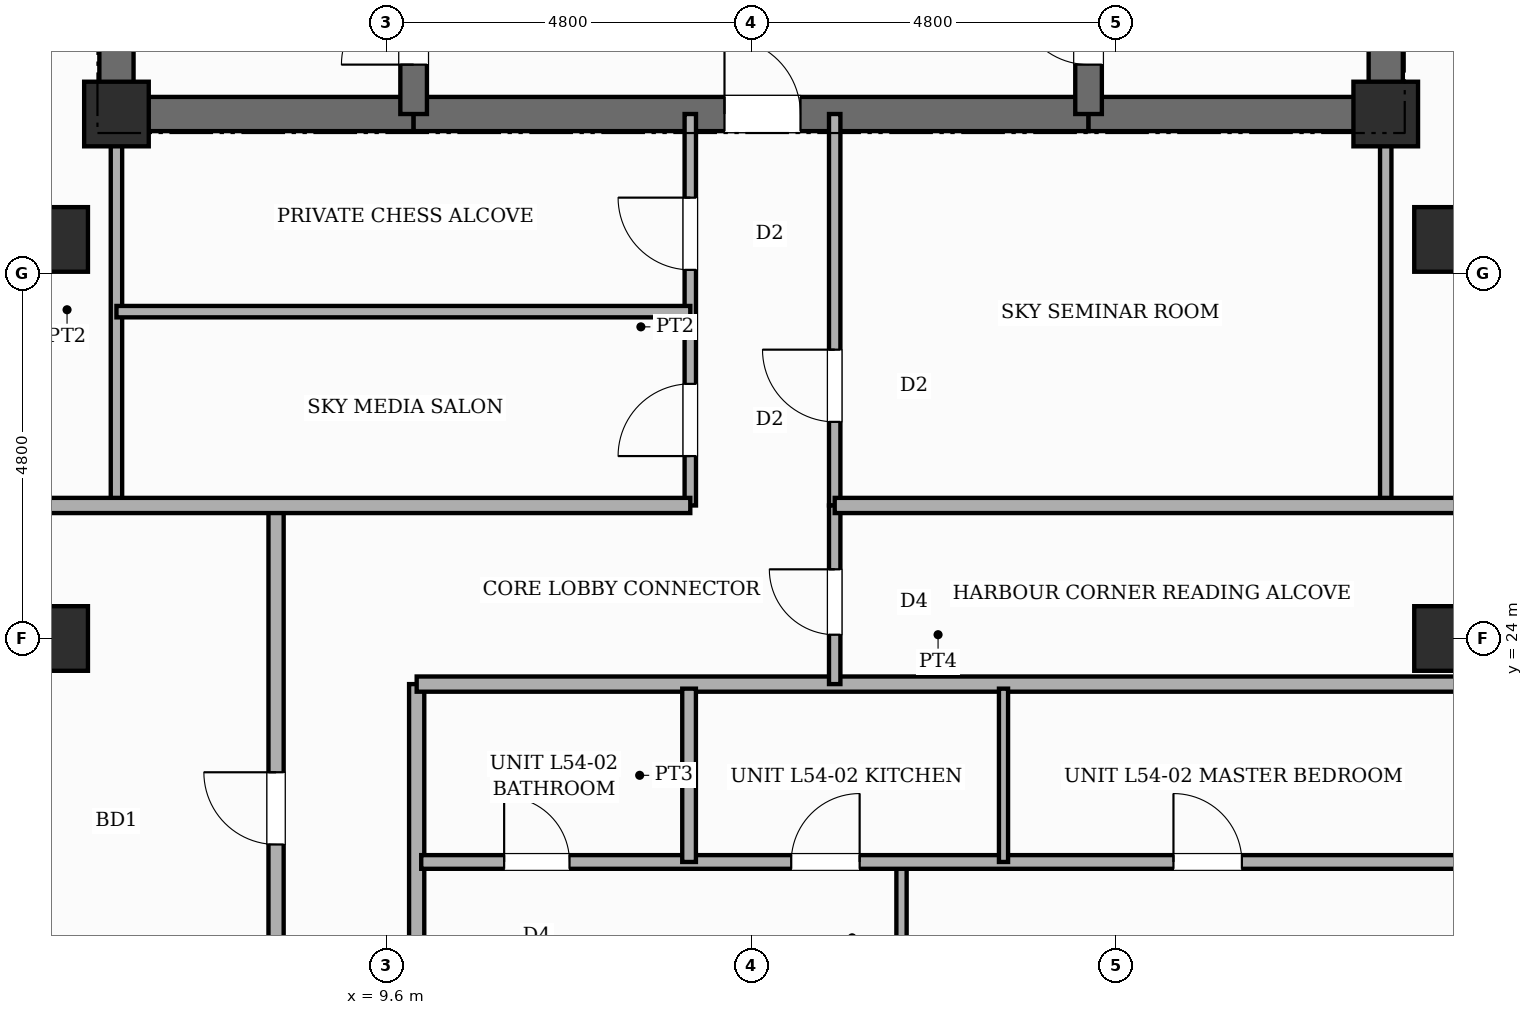
"""IFC4 building model, lengths in metres.
Left out: names, types, materials, properties, quantities, classifications, styles, units other than length and angle.
Written with IfcOpenShell. Run it as: python <this file> out.ifc"""

import sys

from ifc_helpers import new_model, si_unit, direction, frame, frame_2d, origin, origin_2d, place, context, subcontext, project, spatial, rectangle, extrude, element, fill, save


model = new_model("IFC4")
c1 = context("Model", 3, precision=1e-05, world=origin(), true_north=direction((0.0, 1.0)))
c2 = subcontext(c1, "Body", "Model", "MODEL_VIEW")
j1 = project(units=[si_unit("LENGTHUNIT", "METRE"), si_unit("PLANEANGLEUNIT", "RADIAN")], contexts=[c1])
p1 = place(None, origin())
s1 = spatial("IfcSite", under=j1, at=p1, CompositionType="ELEMENT")
p2 = place(p1, origin())
s2 = spatial("IfcBuilding", under=s1, at=p2, CompositionType="ELEMENT")
p3 = place(p2, frame((0.0, 0.0, 207.4)))
s3 = spatial("IfcBuildingStorey", under=s2, at=p3, CompositionType="ELEMENT", Elevation=207.4)
p4 = place(p3, frame((6.05, 30.675, 0.0), z_axis=(0.0, 0.0, 1.0), x_axis=(0.0, 1.0, 0.0)))
e1 = element("IfcWall", 1, at=p4, inside=s3, PredefinedType="SHEAR", context=c2, shape_type="SweptSolid", body=[
    extrude(rectangle(XDim=15.35, YDim=0.45, at=frame_2d((7.675, 0.0))), origin(), (0.0, 0.0, 1.0), 3.6),
])
p5 = place(p4, frame((10.675, 0.0, 0.0)))
e2 = element("IfcOpeningElement", 2, at=p5, cuts=e1, PredefinedType="OPENING", context=c2, shape_type="SweptSolid", body=[
    extrude(rectangle(XDim=0.95, YDim=2.15, at=frame_2d((0.475, 1.075))), frame((0.0, 0.235, 0.0), z_axis=(0.0, -1.0, 0.0), x_axis=(1.0, 0.0, 0.0)), (0.0, 0.0, 1.0), 0.47),
])
p6 = place(p3, frame((22.75, 30.675, 0.0), z_axis=(0.0, 0.0, 1.0), x_axis=(0.0, 1.0, 0.0)))
e3 = element("IfcWall", 3, at=p6, inside=s3, PredefinedType="SHEAR", context=c2, shape_type="SweptSolid", body=[
    extrude(rectangle(XDim=15.35, YDim=0.45, at=frame_2d((7.675, 0.0))), origin(), (0.0, 0.0, 1.0), 3.6),
])
p7 = place(p6, frame((10.675, 0.0, 0.0)))
e4 = element("IfcOpeningElement", 4, at=p7, cuts=e3, PredefinedType="OPENING", context=c2, shape_type="SweptSolid", body=[
    extrude(rectangle(XDim=1.0, YDim=2.15, at=frame_2d((0.5, 1.075))), frame((0.0, 0.235, 0.0), z_axis=(0.0, -1.0, 0.0), x_axis=(1.0, 0.0, 0.0)), (0.0, 0.0, 1.0), 0.47),
])
p8 = place(p3, frame((6.05, 30.9, 0.0), z_axis=(0.0, 0.0, 1.0), x_axis=(1.0, 0.0, 0.0)))
e5 = element("IfcWall", 5, at=p8, inside=s3, PredefinedType="SHEAR", context=c2, shape_type="SweptSolid", body=[
    extrude(rectangle(XDim=3.91, YDim=0.45, at=frame_2d((1.955, 0.0))), origin(), (0.0, 0.0, 1.0), 3.6),
])
p9 = place(p3, frame((9.96, 30.9, 0.0), z_axis=(0.0, 0.0, 1.0), x_axis=(1.0, 0.0, 0.0)))
e6 = element("IfcWall", 6, at=p9, inside=s3, PredefinedType="SHEAR", context=c2, shape_type="SweptSolid", body=[
    extrude(rectangle(XDim=8.88, YDim=0.45, at=frame_2d((4.44, 0.0))), origin(), (0.0, 0.0, 1.0), 3.6),
])
p10 = place(p9, frame((4.09, 0.0, 0.0)))
e7 = element("IfcOpeningElement", 7, at=p10, cuts=e6, PredefinedType="OPENING", context=c2, shape_type="SweptSolid", body=[
    extrude(rectangle(XDim=1.0, YDim=2.15, at=frame_2d((0.5, 1.075))), frame((0.0, 0.235, 0.0), z_axis=(0.0, -1.0, 0.0), x_axis=(1.0, 0.0, 0.0)), (0.0, 0.0, 1.0), 0.47),
])
p11 = place(p3, frame((18.84, 30.9, 0.0), z_axis=(0.0, 0.0, 1.0), x_axis=(1.0, 0.0, 0.0)))
e8 = element("IfcWall", 8, at=p11, inside=s3, PredefinedType="SHEAR", context=c2, shape_type="SweptSolid", body=[
    extrude(rectangle(XDim=3.91, YDim=0.45, at=frame_2d((1.955, 0.0))), origin(), (0.0, 0.0, 1.0), 3.6),
])
p12 = place(p3, frame((9.96, 30.9, 0.0), z_axis=(0.0, 0.0, 1.0), x_axis=(0.0, 1.0, 0.0)))
e9 = element("IfcWall", 9, at=p12, inside=s3, PredefinedType="SHEAR", context=c2, shape_type="SweptSolid", body=[
    extrude(rectangle(XDim=14.9, YDim=0.35, at=frame_2d((7.45, 0.0))), origin(), (0.0, 0.0, 1.0), 3.6),
])
p13 = place(p12, frame((0.65, 0.0, 0.0)))
e10 = element("IfcOpeningElement", 10, at=p13, cuts=e9, PredefinedType="OPENING", context=c2, shape_type="SweptSolid", body=[
    extrude(rectangle(XDim=0.95, YDim=2.1, at=frame_2d((0.475, 1.05))), frame((0.0, 0.185, 0.0), z_axis=(0.0, -1.0, 0.0), x_axis=(1.0, 0.0, 0.0)), (0.0, 0.0, 1.0), 0.37),
])
p14 = place(p12, frame((10.45, 0.0, 0.0)))
e11 = element("IfcOpeningElement", 11, at=p14, cuts=e9, PredefinedType="OPENING", context=c2, shape_type="SweptSolid", body=[
    extrude(rectangle(XDim=1.0, YDim=2.15, at=frame_2d((0.5, 1.075))), frame((0.0, 0.185, 0.0), z_axis=(0.0, -1.0, 0.0), x_axis=(1.0, 0.0, 0.0)), (0.0, 0.0, 1.0), 0.37),
])
p15 = place(p3, frame((18.84, 30.9, 0.0), z_axis=(0.0, 0.0, 1.0), x_axis=(0.0, 1.0, 0.0)))
e12 = element("IfcWall", 12, at=p15, inside=s3, PredefinedType="SHEAR", context=c2, shape_type="SweptSolid", body=[
    extrude(rectangle(XDim=14.9, YDim=0.35, at=frame_2d((7.45, 0.0))), origin(), (0.0, 0.0, 1.0), 3.6),
])
p16 = place(p15, frame((0.65, 0.0, 0.0)))
e13 = element("IfcOpeningElement", 13, at=p16, cuts=e12, PredefinedType="OPENING", context=c2, shape_type="SweptSolid", body=[
    extrude(rectangle(XDim=0.95, YDim=2.1, at=frame_2d((0.475, 1.05))), frame((0.0, 0.185, 0.0), z_axis=(0.0, -1.0, 0.0), x_axis=(1.0, 0.0, 0.0)), (0.0, 0.0, 1.0), 0.37),
])
p17 = place(p15, frame((10.45, 0.0, 0.0)))
e14 = element("IfcOpeningElement", 14, at=p17, cuts=e12, PredefinedType="OPENING", context=c2, shape_type="SweptSolid", body=[
    extrude(rectangle(XDim=1.0, YDim=2.15, at=frame_2d((0.5, 1.075))), frame((0.0, 0.185, 0.0), z_axis=(0.0, -1.0, 0.0), x_axis=(1.0, 0.0, 0.0)), (0.0, 0.0, 1.0), 0.37),
])
for number, where, z_axis, x_axis in (
    (15, (5.25, 24.0, 0.0), (0.0, 0.0, 1.0), (1.0, 0.0, 0.0)),
    (16, (5.25, 29.25, 0.0), (0.0, 0.0, 1.0), (1.0, 0.0, 0.0)),
    (17, (6.05, 30.9, 0.0), (0.0, 0.0, 1.0), (1.0, 0.0, 0.0)),
    (18, (22.75, 30.9, 0.0), (0.0, 0.0, 1.0), (1.0, 0.0, 0.0)),
    (19, (23.55, 24.0, 0.0), (0.0, 0.0, 1.0), (1.0, 0.0, 0.0)),
    (20, (23.55, 29.25, 0.0), (0.0, 0.0, 1.0), (1.0, 0.0, 0.0)),
):
    element("IfcColumn", number, at=place(p3, frame(where, z_axis=z_axis, x_axis=x_axis)), inside=s3, PredefinedType="COLUMN", context=c2, shape_type="SweptSolid", body=[
        extrude(rectangle(XDim=0.85, YDim=0.85, at=origin_2d()), origin(), (0.0, 0.0, 1.0), 3.6),
    ])
p18 = place(p3, frame((13.6, 25.75, 0.0), z_axis=(0.0, 0.0, 1.0), x_axis=(0.0, 1.0, 0.0)))
e21 = element("IfcWall", 21, at=p18, inside=s3, PredefinedType="PARTITIONING", context=c2, shape_type="SweptSolid", body=[
    extrude(rectangle(XDim=5.15, YDim=0.15, at=frame_2d((2.575, 0.0))), origin(), (0.0, 0.0, 1.0), 3.38),
])
p19 = place(p18, frame((0.65, 0.0, 0.0)))
e22 = element("IfcOpeningElement", 22, at=p19, cuts=e21, PredefinedType="OPENING", context=c2, shape_type="SweptSolid", body=[
    extrude(rectangle(XDim=0.95, YDim=2.15, at=frame_2d((0.475, 1.075))), frame((0.0, 0.085, 0.0), z_axis=(0.0, -1.0, 0.0), x_axis=(1.0, 0.0, 0.0)), (0.0, 0.0, 1.0), 0.17),
])
p20 = place(p18, frame((3.1, 0.0, 0.0)))
e23 = element("IfcOpeningElement", 23, at=p20, cuts=e21, PredefinedType="OPENING", context=c2, shape_type="SweptSolid", body=[
    extrude(rectangle(XDim=0.95, YDim=2.15, at=frame_2d((0.475, 1.075))), frame((0.0, 0.085, 0.0), z_axis=(0.0, -1.0, 0.0), x_axis=(1.0, 0.0, 0.0)), (0.0, 0.0, 1.0), 0.17),
])
p21 = place(p3, frame((15.5, 25.75, 0.0), z_axis=(0.0, 0.0, 1.0), x_axis=(0.0, 1.0, 0.0)))
e24 = element("IfcWall", 24, at=p21, inside=s3, PredefinedType="PARTITIONING", context=c2, shape_type="SweptSolid", body=[
    extrude(rectangle(XDim=5.15, YDim=0.15, at=frame_2d((2.575, 0.0))), origin(), (0.0, 0.0, 1.0), 3.38),
])
p22 = place(p21, frame((1.1, 0.0, 0.0)))
e25 = element("IfcOpeningElement", 25, at=p22, cuts=e24, PredefinedType="OPENING", context=c2, shape_type="SweptSolid", body=[
    extrude(rectangle(XDim=0.95, YDim=2.15, at=frame_2d((0.475, 1.075))), frame((0.0, 0.085, 0.0), z_axis=(0.0, -1.0, 0.0), x_axis=(1.0, 0.0, 0.0)), (0.0, 0.0, 1.0), 0.17),
])
for number, where, z_axis, x_axis in (
    (26, (6.05, 25.75, 0.0), (0.0, 0.0, 1.0), (0.0, 1.0, 0.0)),
    (27, (22.75, 25.75, 0.0), (0.0, 0.0, 1.0), (0.0, 1.0, 0.0)),
):
    element("IfcWall", number, at=place(p3, frame(where, z_axis=z_axis, x_axis=x_axis)), inside=s3, PredefinedType="PARTITIONING", context=c2, shape_type="SweptSolid", body=[
        extrude(rectangle(XDim=5.15, YDim=0.15, at=frame_2d((2.575, 0.0))), origin(), (0.0, 0.0, 1.0), 3.38),
    ])
p23 = place(p3, frame((6.05, 28.3, 0.0), z_axis=(0.0, 0.0, 1.0), x_axis=(1.0, 0.0, 0.0)))
e28 = element("IfcWall", 28, at=p23, inside=s3, PredefinedType="PARTITIONING", context=c2, shape_type="SweptSolid", body=[
    extrude(rectangle(XDim=7.55, YDim=0.15, at=frame_2d((3.775, 0.0))), origin(), (0.0, 0.0, 1.0), 3.38),
])
p24 = place(p3, frame((8.15, 9.88, 0.0), z_axis=(0.0, 0.0, 1.0), x_axis=(0.0, 1.0, 0.0)))
e29 = element("IfcWall", 29, at=p24, inside=s3, PredefinedType="PARTITIONING", context=c2, shape_type="SweptSolid", body=[
    extrude(rectangle(XDim=15.87, YDim=0.2, at=frame_2d((7.935, 0.0))), origin(), (0.0, 0.0, 1.0), 3.38),
])
p25 = place(p24, frame((3.49, 0.0, 0.0)))
e30 = element("IfcOpeningElement", 30, at=p25, cuts=e29, PredefinedType="OPENING", context=c2, shape_type="SweptSolid", body=[
    extrude(rectangle(XDim=0.95, YDim=2.15, at=frame_2d((0.475, 1.075))), frame((0.0, 0.11, 0.0), z_axis=(0.0, -1.0, 0.0), x_axis=(1.0, 0.0, 0.0)), (0.0, 0.0, 1.0), 0.22),
])
p26 = place(p24, frame((11.41, 0.0, 0.0)))
e31 = element("IfcOpeningElement", 31, at=p26, cuts=e29, PredefinedType="OPENING", context=c2, shape_type="SweptSolid", body=[
    extrude(rectangle(XDim=0.95, YDim=2.15, at=frame_2d((0.475, 1.075))), frame((0.0, 0.11, 0.0), z_axis=(0.0, -1.0, 0.0), x_axis=(1.0, 0.0, 0.0)), (0.0, 0.0, 1.0), 0.22),
])
p27 = place(p3, frame((10.0, 9.88, 0.0), z_axis=(0.0, 0.0, 1.0), x_axis=(0.0, 1.0, 0.0)))
e32 = element("IfcWall", 32, at=p27, inside=s3, PredefinedType="PARTITIONING", context=c2, shape_type="SweptSolid", body=[
    extrude(rectangle(XDim=13.52, YDim=0.2, at=frame_2d((6.76, 0.0))), origin(), (0.0, 0.0, 1.0), 3.38),
])
p28 = place(p27, frame((0.894, 0.0, 0.0)))
e33 = element("IfcOpeningElement", 33, at=p28, cuts=e32, PredefinedType="OPENING", context=c2, shape_type="SweptSolid", body=[
    extrude(rectangle(XDim=0.98, YDim=2.18, at=frame_2d((0.49, 1.09))), frame((0.0, 0.11, 0.0), z_axis=(0.0, -1.0, 0.0), x_axis=(1.0, 0.0, 0.0)), (0.0, 0.0, 1.0), 0.22),
])
p29 = place(p27, frame((8.18, 0.0, 0.0)))
e34 = element("IfcOpeningElement", 34, at=p29, cuts=e32, PredefinedType="OPENING", context=c2, shape_type="SweptSolid", body=[
    extrude(rectangle(XDim=0.98, YDim=2.18, at=frame_2d((0.49, 1.09))), frame((0.0, 0.11, 0.0), z_axis=(0.0, -1.0, 0.0), x_axis=(1.0, 0.0, 0.0)), (0.0, 0.0, 1.0), 0.22),
])
p30 = place(p3, frame((10.0, 23.4, 0.0), z_axis=(0.0, 0.0, 1.0), x_axis=(1.0, 0.0, 0.0)))
e35 = element("IfcWall", 35, at=p30, inside=s3, PredefinedType="PARTITIONING", context=c2, shape_type="SweptSolid", body=[
    extrude(rectangle(XDim=13.72, YDim=0.2, at=frame_2d((6.86, 0.0))), origin(), (0.0, 0.0, 1.0), 3.38),
])
p31 = place(p3, frame((5.08, 25.75, 0.0), z_axis=(0.0, 0.0, 1.0), x_axis=(1.0, 0.0, 0.0)))
e36 = element("IfcWall", 36, at=p31, inside=s3, PredefinedType="PARTITIONING", context=c2, shape_type="SweptSolid", body=[
    extrude(rectangle(XDim=8.52, YDim=0.2, at=frame_2d((4.26, 0.0))), origin(), (0.0, 0.0, 1.0), 3.38),
])
p32 = place(p3, frame((15.5, 23.4, 0.0), z_axis=(0.0, 0.0, 1.0), x_axis=(0.0, 1.0, 0.0)))
e37 = element("IfcWall", 37, at=p32, inside=s3, PredefinedType="PARTITIONING", context=c2, shape_type="SweptSolid", body=[
    extrude(rectangle(XDim=2.35, YDim=0.15, at=frame_2d((1.175, 0.0))), origin(), (0.0, 0.0, 1.0), 3.38),
])
p33 = place(p32, frame((0.65, 0.0, 0.0)))
e38 = element("IfcOpeningElement", 38, at=p33, cuts=e37, PredefinedType="OPENING", context=c2, shape_type="SweptSolid", body=[
    extrude(rectangle(XDim=0.86, YDim=2.1, at=frame_2d((0.43, 1.05))), frame((0.0, 0.085, 0.0), z_axis=(0.0, -1.0, 0.0), x_axis=(1.0, 0.0, 0.0)), (0.0, 0.0, 1.0), 0.17),
])
p34 = place(p3, frame((15.5, 25.75, 0.0), z_axis=(0.0, 0.0, 1.0), x_axis=(1.0, 0.0, 0.0)))
e39 = element("IfcWall", 39, at=p34, inside=s3, PredefinedType="PARTITIONING", context=c2, shape_type="SweptSolid", body=[
    extrude(rectangle(XDim=8.22, YDim=0.2, at=frame_2d((4.11, 0.0))), origin(), (0.0, 0.0, 1.0), 3.38),
])
p35 = place(p3, frame((16.379, 15.96, 0.0), z_axis=(0.0, 0.0, 1.0), x_axis=(0.0, 1.0, 0.0)))
e40 = element("IfcWall", 40, at=p35, inside=s3, PredefinedType="PARTITIONING", context=c2, shape_type="SweptSolid", body=[
    extrude(rectangle(XDim=5.1, YDim=0.135, at=frame_2d((2.55, 0.0))), origin(), (0.0, 0.0, 1.0), 3.38),
])
p36 = place(p35, frame((1.854, 0.0, 0.0)))
e41 = element("IfcOpeningElement", 41, at=p36, cuts=e40, PredefinedType="OPENING", context=c2, shape_type="SweptSolid", body=[
    extrude(rectangle(XDim=0.9, YDim=2.15, at=frame_2d((0.45, 1.075))), frame((0.0, 0.078, 0.0), z_axis=(0.0, -1.0, 0.0), x_axis=(1.0, 0.0, 0.0)), (0.0, 0.0, 1.0), 0.155),
])
p37 = place(p3, frame((10.06, 21.06, 0.0), z_axis=(0.0, 0.0, 1.0), x_axis=(1.0, 0.0, 0.0)))
e42 = element("IfcWall", 42, at=p37, inside=s3, PredefinedType="PLUMBINGWALL", context=c2, shape_type="SweptSolid", body=[
    extrude(rectangle(XDim=13.66, YDim=0.18, at=frame_2d((6.83, 0.0))), origin(), (0.0, 0.0, 1.0), 3.38),
])
p38 = place(p37, frame((1.091, 0.0, 0.0)))
e43 = element("IfcOpeningElement", 43, at=p38, cuts=e42, PredefinedType="OPENING", context=c2, shape_type="SweptSolid", body=[
    extrude(rectangle(XDim=0.86, YDim=2.1, at=frame_2d((0.43, 1.05))), frame((0.0, 0.1, 0.0), z_axis=(0.0, -1.0, 0.0), x_axis=(1.0, 0.0, 0.0)), (0.0, 0.0, 1.0), 0.2),
])
p39 = place(p37, frame((4.868, 0.0, 0.0)))
e44 = element("IfcOpeningElement", 44, at=p39, cuts=e42, PredefinedType="OPENING", context=c2, shape_type="SweptSolid", body=[
    extrude(rectangle(XDim=0.9, YDim=2.15, at=frame_2d((0.45, 1.075))), frame((0.0, 0.1, 0.0), z_axis=(0.0, -1.0, 0.0), x_axis=(1.0, 0.0, 0.0)), (0.0, 0.0, 1.0), 0.2),
])
p40 = place(p37, frame((9.897, 0.0, 0.0)))
e45 = element("IfcOpeningElement", 45, at=p40, cuts=e42, PredefinedType="OPENING", context=c2, shape_type="SweptSolid", body=[
    extrude(rectangle(XDim=0.9, YDim=2.15, at=frame_2d((0.45, 1.075))), frame((0.0, 0.1, 0.0), z_axis=(0.0, -1.0, 0.0), x_axis=(1.0, 0.0, 0.0)), (0.0, 0.0, 1.0), 0.2),
])
p41 = place(p3, frame((13.584, 21.06, 0.0), z_axis=(0.0, 0.0, 1.0), x_axis=(0.0, 1.0, 0.0)))
e46 = element("IfcWall", 46, at=p41, inside=s3, PredefinedType="PLUMBINGWALL", context=c2, shape_type="SweptSolid", body=[
    extrude(rectangle(XDim=2.28, YDim=0.18, at=frame_2d((1.14, 0.0))), origin(), (0.0, 0.0, 1.0), 3.38),
])
p42 = place(p3, frame((17.721, 21.06, 0.0), z_axis=(0.0, 0.0, 1.0), x_axis=(0.0, 1.0, 0.0)))
e47 = element("IfcWall", 47, at=p42, inside=s3, PredefinedType="PARTITIONING", context=c2, shape_type="SweptSolid", body=[
    extrude(rectangle(XDim=2.28, YDim=0.12, at=frame_2d((1.14, 0.0))), origin(), (0.0, 0.0, 1.0), 3.38),
])
p43 = place(p13, origin())
e48 = element("IfcDoor", 48, at=p43, inside=s3, OperationType="SINGLE_SWING_LEFT", PredefinedType="DOOR", context=c2, shape_type="SweptSolid", body=[
    extrude(rectangle(XDim=0.95, YDim=2.1, at=frame_2d((0.475, 1.05))), frame((0.0, 0.025, 0.0), z_axis=(0.0, -1.0, 0.0), x_axis=(1.0, 0.0, 0.0)), (0.0, 0.0, 1.0), 0.05),
])
fill(e10, e48)
p44 = place(p16, origin())
e49 = element("IfcDoor", 49, at=p44, inside=s3, OperationType="SINGLE_SWING_RIGHT", PredefinedType="DOOR", context=c2, shape_type="SweptSolid", body=[
    extrude(rectangle(XDim=0.95, YDim=2.1, at=frame_2d((0.475, 1.05))), frame((0.0, 0.025, 0.0), z_axis=(0.0, -1.0, 0.0), x_axis=(1.0, 0.0, 0.0)), (0.0, 0.0, 1.0), 0.05),
])
fill(e13, e49)
p45 = place(p10, origin())
e50 = element("IfcDoor", 50, at=p45, inside=s3, OperationType="SINGLE_SWING_LEFT", PredefinedType="DOOR", context=c2, shape_type="SweptSolid", body=[
    extrude(rectangle(XDim=1.0, YDim=2.15, at=frame_2d((0.5, 1.075))), frame((0.0, 0.025, 0.0), z_axis=(0.0, -1.0, 0.0), x_axis=(1.0, 0.0, 0.0)), (0.0, 0.0, 1.0), 0.05),
])
fill(e7, e50)
p46 = place(p19, origin())
e51 = element("IfcDoor", 51, at=p46, inside=s3, OperationType="SINGLE_SWING_LEFT", PredefinedType="DOOR", context=c2, shape_type="SweptSolid", body=[
    extrude(rectangle(XDim=0.95, YDim=2.15, at=frame_2d((0.475, 1.075))), frame((0.0, 0.025, 0.0), z_axis=(0.0, -1.0, 0.0), x_axis=(1.0, 0.0, 0.0)), (0.0, 0.0, 1.0), 0.05),
])
fill(e22, e51)
p47 = place(p20, origin())
e52 = element("IfcDoor", 52, at=p47, inside=s3, OperationType="SINGLE_SWING_RIGHT", PredefinedType="DOOR", context=c2, shape_type="SweptSolid", body=[
    extrude(rectangle(XDim=0.95, YDim=2.15, at=frame_2d((0.475, 1.075))), frame((0.0, 0.025, 0.0), z_axis=(0.0, -1.0, 0.0), x_axis=(1.0, 0.0, 0.0)), (0.0, 0.0, 1.0), 0.05),
])
fill(e23, e52)
p48 = place(p22, origin())
e53 = element("IfcDoor", 53, at=p48, inside=s3, OperationType="SINGLE_SWING_RIGHT", PredefinedType="DOOR", context=c2, shape_type="SweptSolid", body=[
    extrude(rectangle(XDim=0.95, YDim=2.15, at=frame_2d((0.475, 1.075))), frame((0.0, 0.025, 0.0), z_axis=(0.0, -1.0, 0.0), x_axis=(1.0, 0.0, 0.0)), (0.0, 0.0, 1.0), 0.05),
])
fill(e25, e53)
p49 = place(p33, origin())
e54 = element("IfcDoor", 54, at=p49, inside=s3, OperationType="SINGLE_SWING_RIGHT", PredefinedType="DOOR", context=c2, shape_type="SweptSolid", body=[
    extrude(rectangle(XDim=0.86, YDim=2.1, at=frame_2d((0.43, 1.05))), frame((0.0, 0.025, 0.0), z_axis=(0.0, -1.0, 0.0), x_axis=(1.0, 0.0, 0.0)), (0.0, 0.0, 1.0), 0.05),
])
fill(e38, e54)
p50 = place(p26, origin())
e55 = element("IfcDoor", 55, at=p50, inside=s3, OperationType="SINGLE_SWING_RIGHT", PredefinedType="DOOR", context=c2, shape_type="SweptSolid", body=[
    extrude(rectangle(XDim=0.95, YDim=2.15, at=frame_2d((0.475, 1.075))), frame((0.0, 0.025, 0.0), z_axis=(0.0, -1.0, 0.0), x_axis=(1.0, 0.0, 0.0)), (0.0, 0.0, 1.0), 0.05),
])
fill(e31, e55)
p51 = place(p38, origin())
e56 = element("IfcDoor", 56, at=p51, inside=s3, OperationType="SINGLE_SWING_LEFT", PredefinedType="DOOR", context=c2, shape_type="SweptSolid", body=[
    extrude(rectangle(XDim=0.86, YDim=2.1, at=frame_2d((0.43, 1.05))), frame((0.0, 0.025, 0.0), z_axis=(0.0, -1.0, 0.0), x_axis=(1.0, 0.0, 0.0)), (0.0, 0.0, 1.0), 0.05),
])
fill(e43, e56)
p52 = place(p39, origin())
e57 = element("IfcDoor", 57, at=p52, inside=s3, OperationType="SINGLE_SWING_RIGHT", PredefinedType="DOOR", context=c2, shape_type="SweptSolid", body=[
    extrude(rectangle(XDim=0.9, YDim=2.15, at=frame_2d((0.45, 1.075))), frame((0.0, 0.025, 0.0), z_axis=(0.0, -1.0, 0.0), x_axis=(1.0, 0.0, 0.0)), (0.0, 0.0, 1.0), 0.05),
])
fill(e44, e57)
p53 = place(p40, origin())
e58 = element("IfcDoor", 58, at=p53, inside=s3, OperationType="SINGLE_SWING_LEFT", PredefinedType="DOOR", context=c2, shape_type="SweptSolid", body=[
    extrude(rectangle(XDim=0.9, YDim=2.15, at=frame_2d((0.45, 1.075))), frame((0.0, 0.025, 0.0), z_axis=(0.0, -1.0, 0.0), x_axis=(1.0, 0.0, 0.0)), (0.0, 0.0, 1.0), 0.05),
])
fill(e45, e58)
save(model, sys.argv[1])
